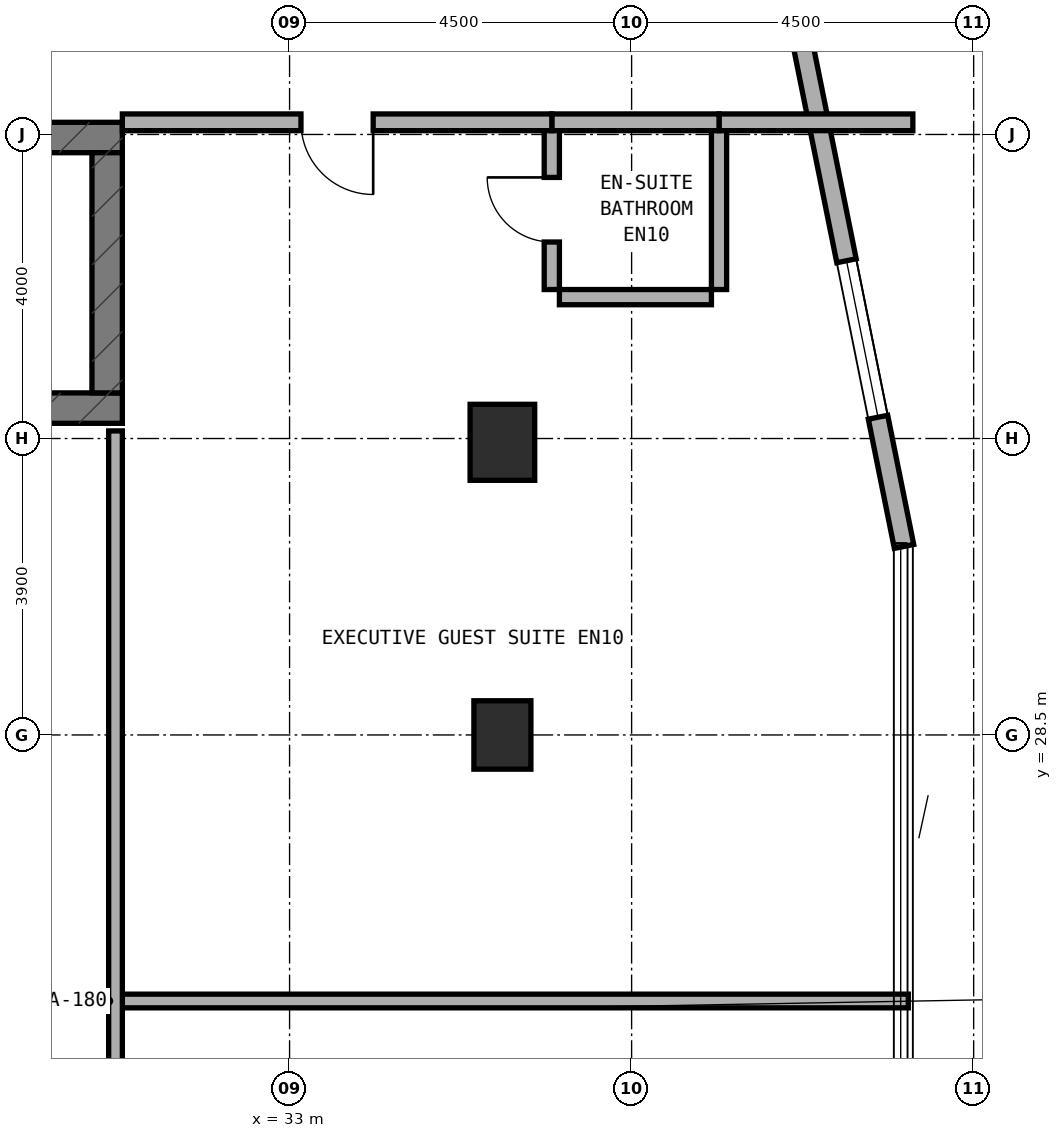
"""IFC4 building model, lengths in metres.
Left out: names, types, materials, properties, quantities, classifications, styles, units other than length and angle.
Written with IfcOpenShell. Run it as: python <this file> out.ifc"""

import sys

from ifc_helpers import new_model, si_unit, direction, frame, frame_2d, origin, origin_2d, place, context, subcontext, project, spatial, rectangle, extrude, element, fill, save


model = new_model("IFC4")
c1 = context("Model", 3, precision=1e-05, world=origin(), true_north=direction((0.0, 1.0)))
c2 = subcontext(c1, "Body", "Model", "MODEL_VIEW")
j1 = project(units=[si_unit("LENGTHUNIT", "METRE"), si_unit("PLANEANGLEUNIT", "RADIAN")], contexts=[c1])
p1 = place(None, origin())
s1 = spatial("IfcSite", under=j1, at=p1, CompositionType="ELEMENT")
p2 = place(p1, origin())
s2 = spatial("IfcBuilding", under=s1, at=p2, CompositionType="ELEMENT")
p3 = place(p2, frame((0.0, 0.0, 152.0)))
s3 = spatial("IfcBuildingStorey", under=s2, at=p3, CompositionType="ELEMENT", Elevation=152.0)
p4 = place(p3, frame((6.4, 32.8, 0.0), z_axis=(0.0, 0.0, 1.0), x_axis=(1.0, 0.0, 0.0)))
e1 = element("IfcWall", 1, at=p4, inside=s3, PredefinedType="SHEAR", context=c2, shape_type="SweptSolid", body=[
    extrude(rectangle(XDim=24.4, YDim=0.4, at=frame_2d((12.2, 0.0))), origin(), (0.0, 0.0, 1.0), 3.5),
])
p5 = place(p4, frame((6.05, 0.0, 0.0)))
e2 = element("IfcOpeningElement", 2, at=p5, cuts=e1, PredefinedType="OPENING", context=c2, shape_type="SweptSolid", body=[
    extrude(rectangle(XDim=1.1, YDim=2.15, at=frame_2d((0.55, 1.075))), frame((0.0, 0.21, 0.0), z_axis=(0.0, -1.0, 0.0), x_axis=(1.0, 0.0, 0.0)), (0.0, 0.0, 1.0), 0.42),
])
p6 = place(p3, frame((6.4, 36.36, 0.0), z_axis=(0.0, 0.0, 1.0), x_axis=(1.0, 0.0, 0.0)))
e3 = element("IfcWall", 3, at=p6, inside=s3, PredefinedType="SHEAR", context=c2, shape_type="SweptSolid", body=[
    extrude(rectangle(XDim=24.4, YDim=0.4, at=frame_2d((12.2, 0.0))), origin(), (0.0, 0.0, 1.0), 3.5),
])
p7 = place(p6, frame((9.15, 0.0, 0.0)))
e4 = element("IfcOpeningElement", 4, at=p7, cuts=e3, PredefinedType="OPENING", context=c2, shape_type="SweptSolid", body=[
    extrude(rectangle(XDim=1.2, YDim=2.15, at=frame_2d((0.6, 1.075))), frame((0.0, 0.21, 0.0), z_axis=(0.0, -1.0, 0.0), x_axis=(1.0, 0.0, 0.0)), (0.0, 0.0, 1.0), 0.42),
])
p8 = place(p6, frame((19.2, 0.0, 0.0)))
e5 = element("IfcOpeningElement", 5, at=p8, cuts=e3, PredefinedType="OPENING", context=c2, shape_type="SweptSolid", body=[
    extrude(rectangle(XDim=0.85, YDim=2.1, at=frame_2d((0.425, 1.05))), frame((0.0, 0.21, 0.0), z_axis=(0.0, -1.0, 0.0), x_axis=(1.0, 0.0, 0.0)), (0.0, 0.0, 1.0), 0.42),
])
p9 = place(p6, frame((16.94, 0.0, 0.0)))
e6 = element("IfcOpeningElement", 6, at=p9, cuts=e3, PredefinedType="OPENING", context=c2, shape_type="SweptSolid", body=[
    extrude(rectangle(XDim=0.85, YDim=2.1, at=frame_2d((0.425, 1.05))), frame((0.0, 0.21, 0.0), z_axis=(0.0, -1.0, 0.0), x_axis=(1.0, 0.0, 0.0)), (0.0, 0.0, 1.0), 0.42),
])
p10 = place(p3, frame((30.6, 33.0, 0.0), z_axis=(0.0, 0.0, 1.0), x_axis=(0.0, 1.0, 0.0)))
e7 = element("IfcWall", 7, at=p10, inside=s3, PredefinedType="SHEAR", context=c2, shape_type="SweptSolid", body=[
    extrude(rectangle(XDim=3.16, YDim=0.4, at=frame_2d((1.58, 0.0))), origin(), (0.0, 0.0, 1.0), 3.5),
])
p11 = place(p3, frame((35.8, 28.5, 0.0), z_axis=(0.0, 0.0, 1.0), x_axis=(1.0, 0.0, 0.0)))
e8 = element("IfcColumn", 8, at=p11, inside=s3, PredefinedType="COLUMN", context=c2, shape_type="SweptSolid", body=[
    extrude(rectangle(XDim=0.75, YDim=0.9, at=origin_2d()), origin(), (0.0, 0.0, 1.0), 3.5),
])
p12 = place(p3, frame((35.8, 32.35, 0.0), z_axis=(0.0, 0.0, 1.0), x_axis=(1.0, 0.0, 0.0)))
e9 = element("IfcColumn", 9, at=p12, inside=s3, PredefinedType="COLUMN", context=c2, shape_type="SweptSolid", body=[
    extrude(rectangle(XDim=0.85, YDim=1.0, at=origin_2d()), origin(), (0.0, 0.0, 1.0), 3.5),
])
p13 = place(p3, frame((41.084, 30.98, 0.0), z_axis=(0.0, 0.0, 1.0), x_axis=(-0.197435082048, 0.980315963543, 0.0)))
e10 = element("IfcWall", 10, at=p13, inside=s3, PredefinedType="STANDARD", context=c2, shape_type="SweptSolid", body=[
    extrude(rectangle(XDim=9.183, YDim=0.26, at=frame_2d((4.591, 0.0))), origin(), (0.0, 0.0, 1.0), 3.22),
])
p14 = place(p13, frame((1.734, 0.0, 0.85)))
e11 = element("IfcOpeningElement", 11, at=p14, cuts=e10, PredefinedType="OPENING", context=c2, shape_type="SweptSolid", body=[
    extrude(rectangle(XDim=2.1, YDim=1.5, at=frame_2d((1.05, 0.75))), frame((0.0, 0.14, 0.0), z_axis=(0.0, -1.0, 0.0), x_axis=(1.0, 0.0, 0.0)), (0.0, 0.0, 1.0), 0.28),
])
p15 = place(p3, frame((30.8, 25.0, 0.0), z_axis=(0.0, 0.0, 1.0), x_axis=(1.0, 0.0, 0.0)))
e12 = element("IfcWall", 12, at=p15, inside=s3, PredefinedType="SOLIDWALL", context=c2, shape_type="SweptSolid", body=[
    extrude(rectangle(XDim=10.34, YDim=0.18, at=frame_2d((5.17, 0.0))), origin(), (0.0, 0.0, 1.0), 2.835),
])
p16 = place(p3, frame((30.71, 17.5, 0.0), z_axis=(0.0, 0.0, 1.0), x_axis=(0.0, 1.0, 0.0)))
e13 = element("IfcWall", 13, at=p16, inside=s3, PredefinedType="SOLIDWALL", context=c2, shape_type="SweptSolid", body=[
    extrude(rectangle(XDim=15.0, YDim=0.18, at=frame_2d((7.5, 0.0))), origin(), (0.0, 0.0, 1.0), 2.795),
])
p17 = place(p3, frame((36.45, 34.36, 0.0), z_axis=(0.0, 0.0, 1.0), x_axis=(0.0, 1.0, 0.0)))
e14 = element("IfcWall", 14, at=p17, inside=s3, PredefinedType="PLUMBINGWALL", context=c2, shape_type="SweptSolid", body=[
    extrude(rectangle(XDim=2.1, YDim=0.2, at=frame_2d((1.05, 0.0))), origin(), (0.0, 0.0, 1.0), 3.22),
])
p18 = place(p17, frame((0.625, 0.0, 0.0)))
e15 = element("IfcOpeningElement", 15, at=p18, cuts=e14, PredefinedType="OPENING", context=c2, shape_type="SweptSolid", body=[
    extrude(rectangle(XDim=0.85, YDim=2.1, at=frame_2d((0.425, 1.05))), frame((0.0, 0.11, 0.0), z_axis=(0.0, -1.0, 0.0), x_axis=(1.0, 0.0, 0.0)), (0.0, 0.0, 1.0), 0.22),
])
p19 = place(p3, frame((36.55, 34.26, 0.0), z_axis=(0.0, 0.0, 1.0), x_axis=(1.0, 0.0, 0.0)))
e16 = element("IfcWall", 16, at=p19, inside=s3, PredefinedType="PLUMBINGWALL", context=c2, shape_type="SweptSolid", body=[
    extrude(rectangle(XDim=2.0, YDim=0.2, at=frame_2d((1.0, 0.0))), origin(), (0.0, 0.0, 1.0), 3.22),
])
p20 = place(p3, frame((38.65, 34.36, 0.0), z_axis=(0.0, 0.0, 1.0), x_axis=(0.0, 1.0, 0.0)))
e17 = element("IfcWall", 17, at=p20, inside=s3, PredefinedType="PLUMBINGWALL", context=c2, shape_type="SweptSolid", body=[
    extrude(rectangle(XDim=2.1, YDim=0.2, at=frame_2d((1.05, 0.0))), origin(), (0.0, 0.0, 1.0), 3.22),
])
p21 = place(p3, frame((38.65, 36.56, 0.0), z_axis=(0.0, 0.0, 1.0), x_axis=(1.0, 0.0, 0.0)))
e18 = element("IfcWall", 18, at=p21, inside=s3, PredefinedType="SOLIDWALL", context=c2, shape_type="SweptSolid", body=[
    extrude(rectangle(XDim=2.55, YDim=0.22, at=frame_2d((1.275, 0.0))), origin(), (0.0, 0.0, 1.0), 3.22),
])
p22 = place(p3, frame((36.45, 36.56, 0.0), z_axis=(0.0, 0.0, 1.0), x_axis=(1.0, 0.0, 0.0)))
e19 = element("IfcWall", 19, at=p22, inside=s3, PredefinedType="SOLIDWALL", context=c2, shape_type="SweptSolid", body=[
    extrude(rectangle(XDim=2.2, YDim=0.22, at=frame_2d((1.1, 0.0))), origin(), (0.0, 0.0, 1.0), 3.22),
])
p23 = place(p3, frame((30.8, 36.56, 0.0), z_axis=(0.0, 0.0, 1.0), x_axis=(1.0, 0.0, 0.0)))
e20 = element("IfcWall", 20, at=p23, inside=s3, PredefinedType="SOLIDWALL", context=c2, shape_type="SweptSolid", body=[
    extrude(rectangle(XDim=5.65, YDim=0.22, at=frame_2d((2.825, 0.0))), origin(), (0.0, 0.0, 1.0), 2.795),
])
p24 = place(p23, frame((2.35, 0.0, 0.0)))
e21 = element("IfcOpeningElement", 21, at=p24, cuts=e20, PredefinedType="OPENING", context=c2, shape_type="SweptSolid", body=[
    extrude(rectangle(XDim=0.95, YDim=2.1, at=frame_2d((0.475, 1.05))), frame((0.0, 0.12, 0.0), z_axis=(0.0, -1.0, 0.0), x_axis=(1.0, 0.0, 0.0)), (0.0, 0.0, 1.0), 0.24),
])
p25 = place(p14, origin())
e22 = element("IfcWindow", 22, at=p25, inside=s3, PartitioningType="SINGLE_PANEL", PredefinedType="WINDOW", context=c2, shape_type="SweptSolid", body=[
    extrude(rectangle(XDim=2.1, YDim=1.5, at=frame_2d((1.05, 0.75))), frame((0.0, 0.03, 0.0), z_axis=(0.0, -1.0, 0.0), x_axis=(1.0, 0.0, 0.0)), (0.0, 0.0, 1.0), 0.06),
])
fill(e11, e22)
p26 = place(p18, origin())
e23 = element("IfcDoor", 23, at=p26, inside=s3, OperationType="SINGLE_SWING_RIGHT", PredefinedType="DOOR", context=c2, shape_type="SweptSolid", body=[
    extrude(rectangle(XDim=0.85, YDim=2.1, at=frame_2d((0.425, 1.05))), frame((0.0, 0.025, 0.0), z_axis=(0.0, -1.0, 0.0), x_axis=(1.0, 0.0, 0.0)), (0.0, 0.0, 1.0), 0.05),
])
fill(e15, e23)
p27 = place(p24, frame((0.95, 0.0, 0.0), z_axis=(0.0, 0.0, 1.0), x_axis=(-1.0, 0.0, 0.0)))
e24 = element("IfcDoor", 24, at=p27, inside=s3, OperationType="SINGLE_SWING_LEFT", PredefinedType="DOOR", context=c2, shape_type="SweptSolid", body=[
    extrude(rectangle(XDim=0.95, YDim=2.1, at=frame_2d((0.475, 1.05))), frame((0.0, 0.025, 0.0), z_axis=(0.0, -1.0, 0.0), x_axis=(1.0, 0.0, 0.0)), (0.0, 0.0, 1.0), 0.05),
])
fill(e21, e24)
save(model, sys.argv[1])
